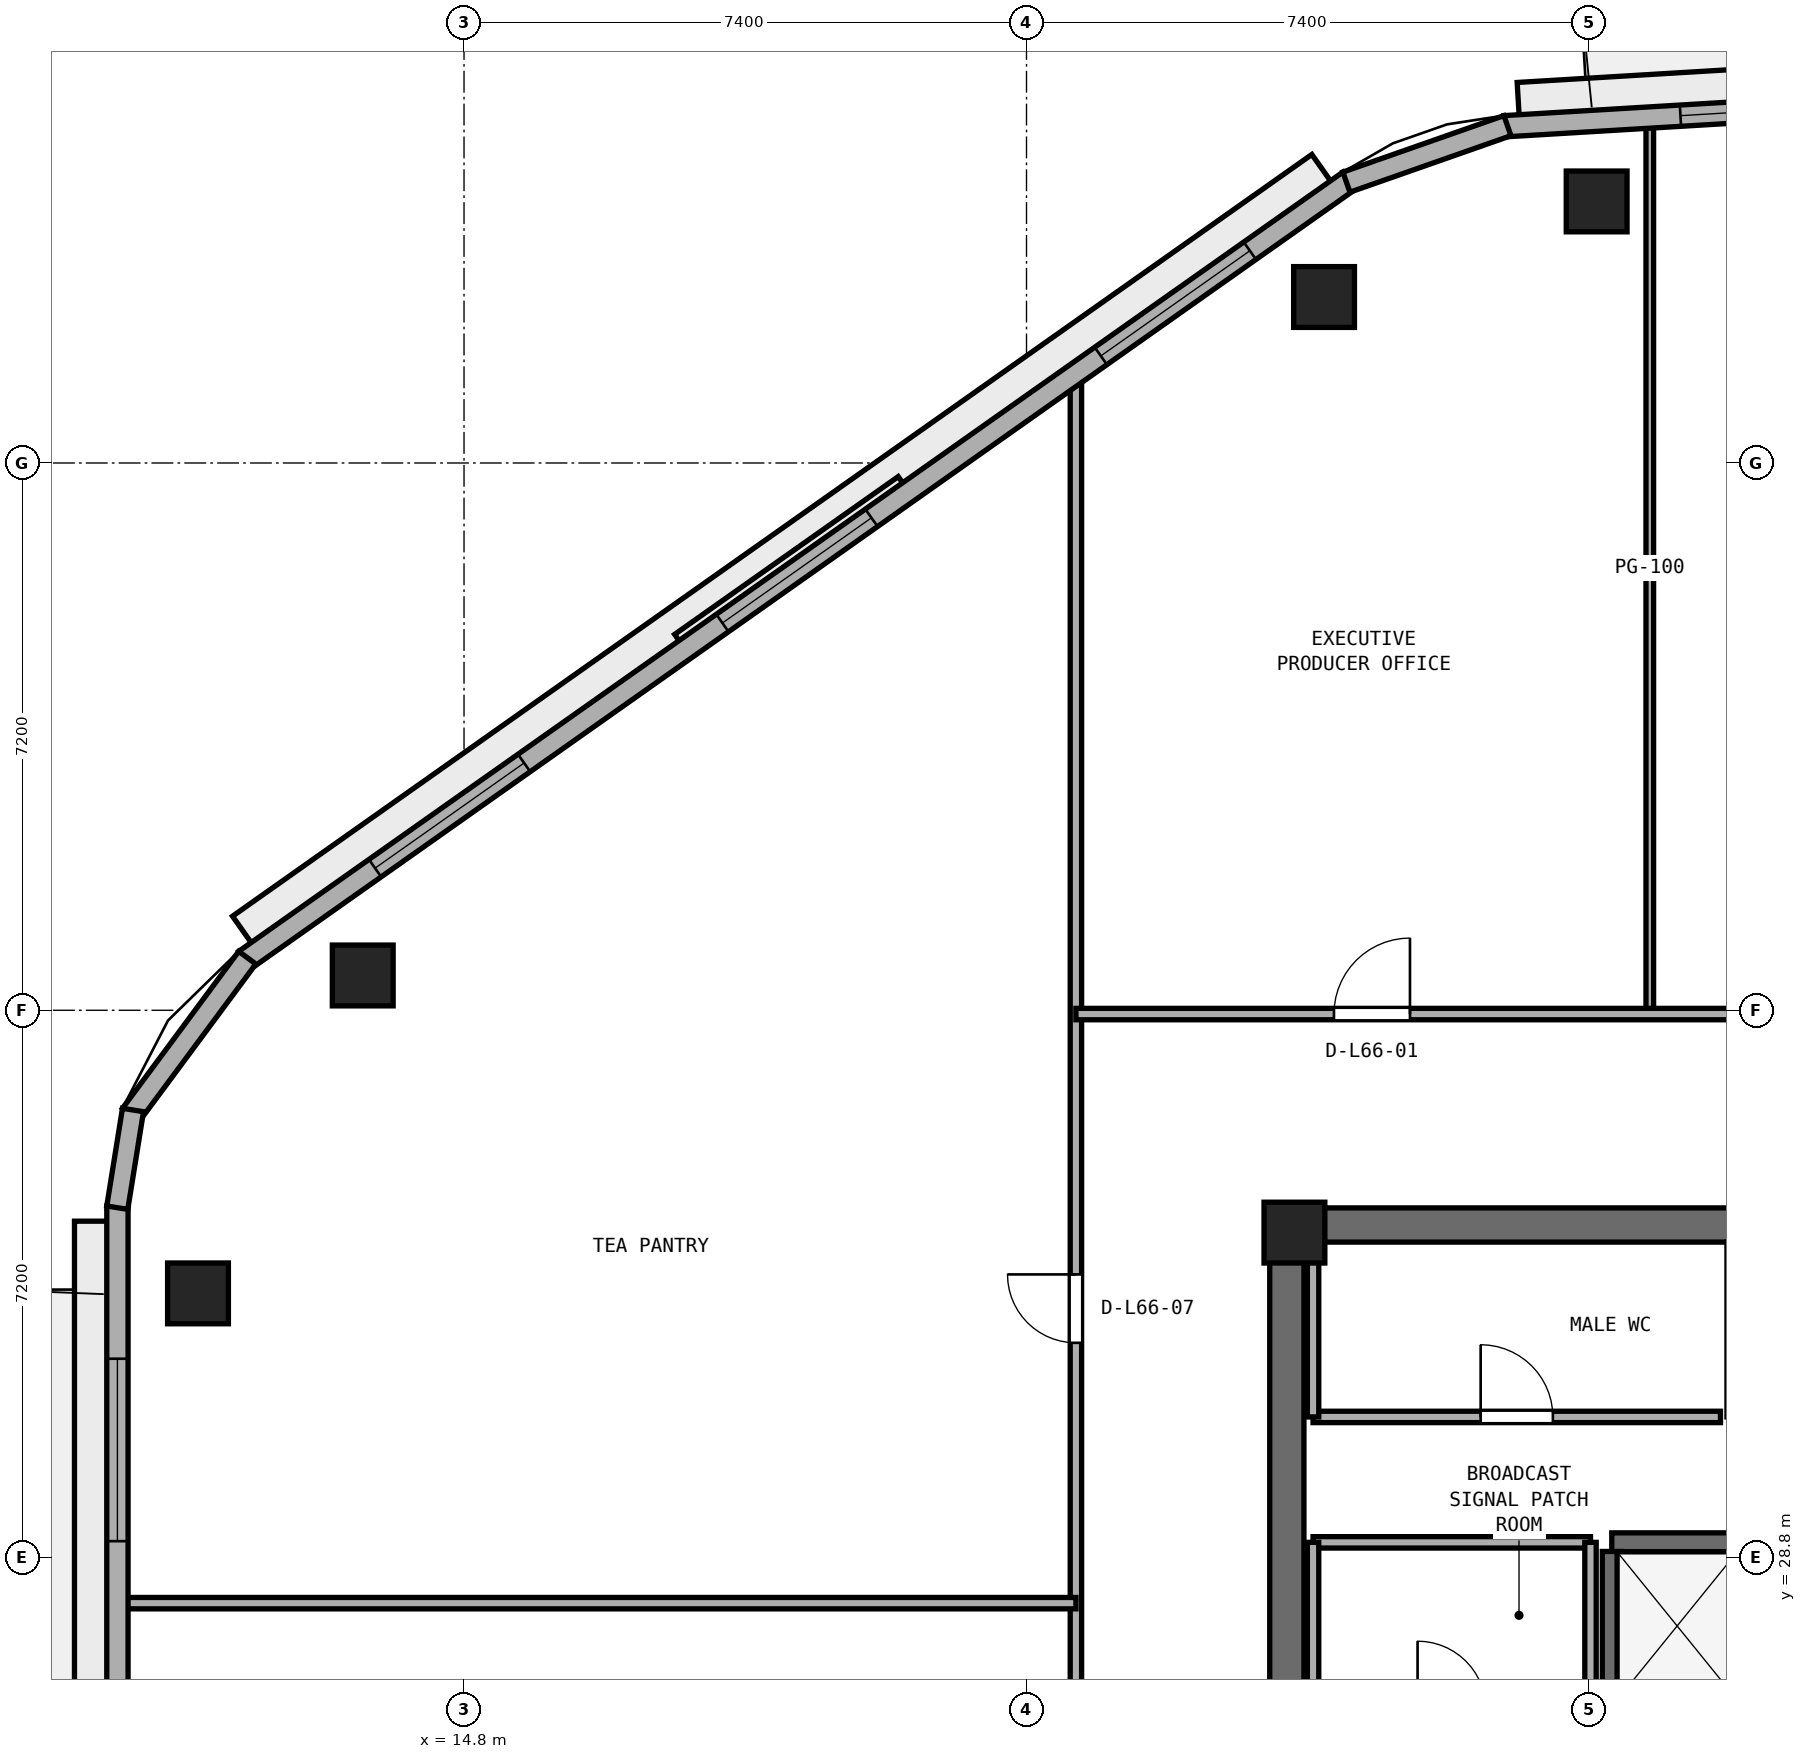
"""IFC4 building model, lengths in metres.
Left out: names, types, materials, properties, quantities, classifications, styles, units other than length and angle.
Written with IfcOpenShell. Run it as: python <this file> out.ifc"""

import sys

from ifc_helpers import new_model, si_unit, direction, frame, frame_2d, origin, origin_2d, place, context, subcontext, project, spatial, rectangle, extrude, element, fill, save


model = new_model("IFC4")
c1 = context("Model", 3, precision=1e-05, world=origin(), true_north=direction((0.0, 1.0)))
c2 = subcontext(c1, "Body", "Model", "MODEL_VIEW")
j1 = project(units=[si_unit("LENGTHUNIT", "METRE"), si_unit("PLANEANGLEUNIT", "RADIAN")], contexts=[c1])
p1 = place(None, origin())
s1 = spatial("IfcSite", under=j1, at=p1, CompositionType="ELEMENT")
p2 = place(p1, origin())
s2 = spatial("IfcBuilding", under=s1, at=p2, CompositionType="ELEMENT")
p3 = place(p2, frame((0.0, 0.0, 259.2)))
s3 = spatial("IfcBuildingStorey", under=s2, at=p3, CompositionType="ELEMENT", Elevation=259.2)
p4 = place(p3, frame((25.4, 33.175, 0.0), z_axis=(0.0, 0.0, 1.0), x_axis=(1.0, 0.0, 0.0)))
e1 = element("IfcWall", 1, at=p4, inside=s3, PredefinedType="SHEAR", context=c2, shape_type="SweptSolid", body=[
    extrude(rectangle(XDim=23.2, YDim=0.45, at=frame_2d((11.6, 0.0))), origin(), (0.0, 0.0, 1.0), 3.51),
])
p5 = place(p3, frame((25.625, 17.45, 0.0), z_axis=(0.0, 0.0, 1.0), x_axis=(0.0, 1.0, 0.0)))
e2 = element("IfcWall", 2, at=p5, inside=s3, PredefinedType="SHEAR", context=c2, shape_type="SweptSolid", body=[
    extrude(rectangle(XDim=15.5, YDim=0.45, at=frame_2d((7.75, 0.0))), origin(), (0.0, 0.0, 1.0), 3.51),
])
p6 = place(p5, frame((7.0, 0.0, 0.0)))
e3 = element("IfcOpeningElement", 3, at=p6, cuts=e2, PredefinedType="OPENING", context=c2, shape_type="SweptSolid", body=[
    extrude(rectangle(XDim=1.5, YDim=2.15, at=frame_2d((0.75, 1.075))), frame((0.0, 0.235, 0.0), z_axis=(0.0, -1.0, 0.0), x_axis=(1.0, 0.0, 0.0)), (0.0, 0.0, 1.0), 0.47),
])
p7 = place(p3, frame((25.725, 33.075, 0.0), z_axis=(0.0, 0.0, 1.0), x_axis=(1.0, 0.0, 0.0)))
e4 = element("IfcColumn", 4, at=p7, inside=s3, PredefinedType="PILASTER", context=c2, shape_type="SweptSolid", body=[
    extrude(rectangle(XDim=0.8, YDim=0.8, at=origin_2d()), origin(), (0.0, 0.0, 1.0), 3.8),
])
for number, where, z_axis, x_axis in (
    (5, (29.701, 46.641, 0.0), (0.0, 0.0, 1.0), (1.0, 0.0, 0.0)),
    (6, (26.115, 45.384, 0.0), (0.0, 0.0, 1.0), (1.0, 0.0, 0.0)),
    (7, (13.467, 36.458, 0.0), (0.0, 0.0, 1.0), (1.0, 0.0, 0.0)),
    (8, (11.3, 32.275, 0.0), (0.0, 0.0, 1.0), (1.0, 0.0, 0.0)),
):
    element("IfcColumn", number, at=place(p3, frame(where, z_axis=z_axis, x_axis=x_axis)), inside=s3, PredefinedType="COLUMN", context=c2, shape_type="SweptSolid", body=[
        extrude(rectangle(XDim=0.8, YDim=0.8, at=origin_2d()), origin(), (0.0, 0.0, 1.0), 3.8),
    ])
p8 = place(p3, frame((29.9, 29.0, 0.0), z_axis=(0.0, 0.0, 1.0), x_axis=(1.0, 0.0, 0.0)))
e9 = element("IfcWall", 9, at=p8, inside=s3, PredefinedType="SHEAR", context=c2, shape_type="SweptSolid", body=[
    extrude(rectangle(XDim=1.72, YDim=0.25, at=frame_2d((0.86, 0.0))), origin(), (0.0, 0.0, 1.0), 3.51),
])
p9 = place(p3, frame((29.9, 26.92, 0.0), z_axis=(0.0, 0.0, 1.0), x_axis=(0.0, 1.0, 0.0)))
e10 = element("IfcWall", 10, at=p9, inside=s3, PredefinedType="SHEAR", context=c2, shape_type="SweptSolid", body=[
    extrude(rectangle(XDim=1.96, YDim=0.25, at=frame_2d((0.98, 0.0))), origin(), (0.0, 0.0, 1.0), 3.51),
])
p10 = place(p3, frame((25.97, 30.65, 0.0), z_axis=(0.0, 0.0, 1.0), x_axis=(1.0, 0.0, 0.0)))
e11 = element("IfcWall", 11, at=p10, inside=s3, PredefinedType="PARTITIONING", context=c2, shape_type="SweptSolid", body=[
    extrude(rectangle(XDim=5.36, YDim=0.15, at=frame_2d((2.68, 0.0))), origin(), (0.0, 0.0, 1.0), 3.51),
])
p11 = place(p10, frame((2.205, 0.0, 0.0)))
e12 = element("IfcOpeningElement", 12, at=p11, cuts=e11, PredefinedType="OPENING", context=c2, shape_type="SweptSolid", body=[
    extrude(rectangle(XDim=0.95, YDim=2.1, at=frame_2d((0.475, 1.05))), frame((0.0, 0.085, 0.0), z_axis=(0.0, -1.0, 0.0), x_axis=(1.0, 0.0, 0.0)), (0.0, 0.0, 1.0), 0.17),
])
p12 = place(p3, frame((25.97, 30.65, 0.0), z_axis=(0.0, 0.0, 1.0), x_axis=(0.0, 1.0, 0.0)))
e13 = element("IfcWall", 13, at=p12, inside=s3, PredefinedType="PARTITIONING", context=c2, shape_type="SweptSolid", body=[
    extrude(rectangle(XDim=2.3, YDim=0.15, at=frame_2d((1.15, 0.0))), origin(), (0.0, 0.0, 1.0), 2.61),
])
p13 = place(p3, frame((25.97, 29.0, 0.0), z_axis=(0.0, 0.0, 1.0), x_axis=(1.0, 0.0, 0.0)))
e14 = element("IfcWall", 14, at=p13, inside=s3, PredefinedType="PARTITIONING", context=c2, shape_type="SweptSolid", body=[
    extrude(rectangle(XDim=3.65, YDim=0.15, at=frame_2d((1.825, 0.0))), origin(), (0.0, 0.0, 1.0), 3.51),
])
p14 = place(p3, frame((25.97, 26.8, 0.0), z_axis=(0.0, 0.0, 1.0), x_axis=(0.0, 1.0, 0.0)))
e15 = element("IfcWall", 15, at=p14, inside=s3, PredefinedType="PARTITIONING", context=c2, shape_type="SweptSolid", body=[
    extrude(rectangle(XDim=2.2, YDim=0.15, at=frame_2d((1.1, 0.0))), origin(), (0.0, 0.0, 1.0), 2.61),
])
p15 = place(p3, frame((29.62, 26.8, 0.0), z_axis=(0.0, 0.0, 1.0), x_axis=(0.0, 1.0, 0.0)))
e16 = element("IfcWall", 16, at=p15, inside=s3, PredefinedType="PARTITIONING", context=c2, shape_type="SweptSolid", body=[
    extrude(rectangle(XDim=2.2, YDim=0.15, at=frame_2d((1.1, 0.0))), origin(), (0.0, 0.0, 1.0), 3.51),
])
p16 = place(p3, frame((30.4, 35.95, 0.0), z_axis=(0.0, 0.0, 1.0), x_axis=(0.0, 1.0, 0.0)))
e17 = element("IfcWall", 17, at=p16, inside=s3, PredefinedType="PARTITIONING", context=c2, shape_type="SweptSolid", body=[
    extrude(rectangle(XDim=11.73, YDim=0.1, at=frame_2d((5.865, 0.0))), origin(), (0.0, 0.0, 1.0), 3.51),
])
p17 = place(p3, frame((22.85, 5.758, 0.0), z_axis=(0.0, 0.0, 1.0), x_axis=(0.0, 1.0, 0.0)))
e18 = element("IfcWall", 18, at=p17, inside=s3, PredefinedType="PARTITIONING", context=c2, shape_type="SweptSolid", body=[
    extrude(rectangle(XDim=38.65, YDim=0.15, at=frame_2d((19.325, 0.0))), origin(), (0.0, 0.0, 1.0), 3.51),
])
p18 = place(p17, frame((11.367, 0.0, 0.0)))
e19 = element("IfcOpeningElement", 19, at=p18, cuts=e18, PredefinedType="OPENING", context=c2, shape_type="SweptSolid", body=[
    extrude(rectangle(XDim=0.9, YDim=2.1, at=frame_2d((0.45, 1.05))), frame((0.0, 0.085, 0.0), z_axis=(0.0, -1.0, 0.0), x_axis=(1.0, 0.0, 0.0)), (0.0, 0.0, 1.0), 0.17),
])
p19 = place(p17, frame((18.242, 0.0, 0.0)))
e20 = element("IfcOpeningElement", 20, at=p19, cuts=e18, PredefinedType="OPENING", context=c2, shape_type="SweptSolid", body=[
    extrude(rectangle(XDim=0.9, YDim=2.1, at=frame_2d((0.45, 1.05))), frame((0.0, 0.085, 0.0), z_axis=(0.0, -1.0, 0.0), x_axis=(1.0, 0.0, 0.0)), (0.0, 0.0, 1.0), 0.17),
])
p20 = place(p17, frame((25.867, 0.0, 0.0)))
e21 = element("IfcOpeningElement", 21, at=p20, cuts=e18, PredefinedType="OPENING", context=c2, shape_type="SweptSolid", body=[
    extrude(rectangle(XDim=0.9, YDim=2.1, at=frame_2d((0.45, 1.05))), frame((0.0, 0.085, 0.0), z_axis=(0.0, -1.0, 0.0), x_axis=(1.0, 0.0, 0.0)), (0.0, 0.0, 1.0), 0.17),
])
p21 = place(p3, frame((10.305, 28.2, 0.0), z_axis=(0.0, 0.0, 1.0), x_axis=(1.0, 0.0, 0.0)))
e22 = element("IfcWall", 22, at=p21, inside=s3, PredefinedType="PARTITIONING", context=c2, shape_type="SweptSolid", body=[
    extrude(rectangle(XDim=12.545, YDim=0.15, at=frame_2d((6.272, 0.0))), origin(), (0.0, 0.0, 1.0), 3.51),
])
p22 = place(p3, frame((22.85, 35.95, 0.0), z_axis=(0.0, 0.0, 1.0), x_axis=(1.0, 0.0, 0.0)))
e23 = element("IfcWall", 23, at=p22, inside=s3, PredefinedType="PARTITIONING", context=c2, shape_type="SweptSolid", body=[
    extrude(rectangle(XDim=25.75, YDim=0.15, at=frame_2d((12.875, 0.0))), origin(), (0.0, 0.0, 1.0), 3.51),
])
p23 = place(p22, frame((3.395, 0.0, 0.0)))
e24 = element("IfcOpeningElement", 24, at=p23, cuts=e23, PredefinedType="OPENING", context=c2, shape_type="SweptSolid", body=[
    extrude(rectangle(XDim=1.0, YDim=2.12, at=frame_2d((0.5, 1.06))), frame((0.0, 0.085, 0.0), z_axis=(0.0, -1.0, 0.0), x_axis=(1.0, 0.0, 0.0)), (0.0, 0.0, 1.0), 0.17),
])
p24 = place(p22, frame((16.03, 0.0, 0.0)))
e25 = element("IfcOpeningElement", 25, at=p24, cuts=e23, PredefinedType="OPENING", context=c2, shape_type="SweptSolid", body=[
    extrude(rectangle(XDim=1.0, YDim=2.12, at=frame_2d((0.5, 1.06))), frame((0.0, 0.085, 0.0), z_axis=(0.0, -1.0, 0.0), x_axis=(1.0, 0.0, 0.0)), (0.0, 0.0, 1.0), 0.17),
])
p25 = place(p3, frame((47.566, 48.775, 0.0), z_axis=(0.0, 0.0, 1.0), x_axis=(-0.998202767485, -0.059926913695, 0.0)))
e26 = element("IfcWall", 26, at=p25, inside=s3, PredefinedType="STANDARD", context=c2, shape_type="SweptSolid", body=[
    extrude(rectangle(XDim=19.111, YDim=0.28, at=frame_2d((9.556, 0.0))), origin(), (0.0, 0.0, 1.0), 3.51),
])
p26 = place(p25, frame((9.005, 0.0, 0.0)))
e27 = element("IfcOpeningElement", 27, at=p26, cuts=e26, PredefinedType="OPENING", context=c2, shape_type="SweptSolid", body=[
    extrude(rectangle(XDim=1.1, YDim=2.2, at=frame_2d((0.55, 1.1))), frame((0.0, 0.15, 0.0), z_axis=(0.0, -1.0, 0.0), x_axis=(1.0, 0.0, 0.0)), (0.0, 0.0, 1.0), 0.3),
])
p27 = place(p25, frame((2.319, 0.0, 0.9)))
e28 = element("IfcOpeningElement", 28, at=p27, cuts=e26, PredefinedType="OPENING", context=c2, shape_type="SweptSolid", body=[
    extrude(rectangle(XDim=2.4, YDim=1.75, at=frame_2d((1.2, 0.875))), frame((0.0, 0.15, 0.0), z_axis=(0.0, -1.0, 0.0), x_axis=(1.0, 0.0, 0.0)), (0.0, 0.0, 1.0), 0.3),
])
p28 = place(p25, frame((14.392, 0.0, 0.9)))
e29 = element("IfcOpeningElement", 29, at=p28, cuts=e26, PredefinedType="OPENING", context=c2, shape_type="SweptSolid", body=[
    extrude(rectangle(XDim=2.4, YDim=1.75, at=frame_2d((1.2, 0.875))), frame((0.0, 0.15, 0.0), z_axis=(0.0, -1.0, 0.0), x_axis=(1.0, 0.0, 0.0)), (0.0, 0.0, 1.0), 0.3),
])
p29 = place(p3, frame((26.443, 46.913, 0.0), z_axis=(0.0, 0.0, 1.0), x_axis=(-0.817024179766, -0.576603407619, 0.0)))
e30 = element("IfcWall", 30, at=p29, inside=s3, PredefinedType="STANDARD", context=c2, shape_type="SweptSolid", body=[
    extrude(rectangle(XDim=17.78, YDim=0.28, at=frame_2d((8.89, 0.0))), origin(), (0.0, 0.0, 1.0), 3.51),
])
p30 = place(p29, frame((1.597, 0.0, 0.9)))
e31 = element("IfcOpeningElement", 31, at=p30, cuts=e30, PredefinedType="OPENING", context=c2, shape_type="SweptSolid", body=[
    extrude(rectangle(XDim=2.4, YDim=1.75, at=frame_2d((1.2, 0.875))), frame((0.0, 0.15, 0.0), z_axis=(0.0, -1.0, 0.0), x_axis=(1.0, 0.0, 0.0)), (0.0, 0.0, 1.0), 0.3),
])
p31 = place(p29, frame((7.69, 0.0, 0.9)))
e32 = element("IfcOpeningElement", 32, at=p31, cuts=e30, PredefinedType="OPENING", context=c2, shape_type="SweptSolid", body=[
    extrude(rectangle(XDim=2.4, YDim=1.75, at=frame_2d((1.2, 0.875))), frame((0.0, 0.15, 0.0), z_axis=(0.0, -1.0, 0.0), x_axis=(1.0, 0.0, 0.0)), (0.0, 0.0, 1.0), 0.3),
])
p32 = place(p29, frame((13.283, 0.0, 0.9)))
e33 = element("IfcOpeningElement", 33, at=p32, cuts=e30, PredefinedType="OPENING", context=c2, shape_type="SweptSolid", body=[
    extrude(rectangle(XDim=2.4, YDim=1.75, at=frame_2d((1.2, 0.875))), frame((0.0, 0.15, 0.0), z_axis=(0.0, -1.0, 0.0), x_axis=(1.0, 0.0, 0.0)), (0.0, 0.0, 1.0), 0.3),
])
p33 = place(p3, frame((10.24, 33.425, 0.0), z_axis=(0.0, 0.0, 1.0), x_axis=(0.0, -1.0, 0.0)))
e34 = element("IfcWall", 34, at=p33, inside=s3, PredefinedType="STANDARD", context=c2, shape_type="SweptSolid", body=[
    extrude(rectangle(XDim=17.257, YDim=0.28, at=frame_2d((8.628, 0.0))), origin(), (0.0, 0.0, 1.0), 3.51),
])
p34 = place(p33, frame((8.078, 0.0, 0.0)))
e35 = element("IfcOpeningElement", 35, at=p34, cuts=e34, PredefinedType="OPENING", context=c2, shape_type="SweptSolid", body=[
    extrude(rectangle(XDim=1.1, YDim=2.2, at=frame_2d((0.55, 1.1))), frame((0.0, 0.15, 0.0), z_axis=(0.0, -1.0, 0.0), x_axis=(1.0, 0.0, 0.0)), (0.0, 0.0, 1.0), 0.3),
])
p35 = place(p33, frame((2.01, 0.0, 0.9)))
e36 = element("IfcOpeningElement", 36, at=p35, cuts=e34, PredefinedType="OPENING", context=c2, shape_type="SweptSolid", body=[
    extrude(rectangle(XDim=2.4, YDim=1.75, at=frame_2d((1.2, 0.875))), frame((0.0, 0.15, 0.0), z_axis=(0.0, -1.0, 0.0), x_axis=(1.0, 0.0, 0.0)), (0.0, 0.0, 1.0), 0.3),
])
p36 = place(p33, frame((13.097, 0.0, 0.9)))
e37 = element("IfcOpeningElement", 37, at=p36, cuts=e34, PredefinedType="OPENING", context=c2, shape_type="SweptSolid", body=[
    extrude(rectangle(XDim=2.4, YDim=1.75, at=frame_2d((1.2, 0.875))), frame((0.0, 0.15, 0.0), z_axis=(0.0, -1.0, 0.0), x_axis=(1.0, 0.0, 0.0)), (0.0, 0.0, 1.0), 0.3),
])
p37 = place(p3, frame((28.527, 47.638, 0.0), z_axis=(0.0, 0.0, 1.0), x_axis=(-0.943686979207, -0.330839667022, 0.0)))
e38 = element("IfcWall", 38, at=p37, inside=s3, PredefinedType="STANDARD", context=c2, shape_type="SweptSolid", body=[
    extrude(rectangle(XDim=2.245, YDim=0.28, at=frame_2d((1.123, 0.0))), origin(), (0.0, 0.0, 1.0), 3.51),
])
p38 = place(p3, frame((11.948, 36.692, 0.0), z_axis=(0.0, 0.0, 1.0), x_axis=(-0.595170751493, -0.803599263668, 0.0)))
e39 = element("IfcWall", 39, at=p38, inside=s3, PredefinedType="STANDARD", context=c2, shape_type="SweptSolid", body=[
    extrude(rectangle(XDim=2.57, YDim=0.28, at=frame_2d((1.285, 0.0))), origin(), (0.0, 0.0, 1.0), 3.51),
])
p39 = place(p3, frame((10.445, 34.688, 0.0), z_axis=(0.0, 0.0, 1.0), x_axis=(-0.158524605336, -0.987355027081, 0.0)))
e40 = element("IfcWall", 40, at=p39, inside=s3, PredefinedType="STANDARD", context=c2, shape_type="SweptSolid", body=[
    extrude(rectangle(XDim=1.301, YDim=0.28, at=frame_2d((0.651, 0.0))), origin(), (0.0, 0.0, 1.0), 3.51),
])
p40 = place(p11, origin())
e41 = element("IfcDoor", 41, at=p40, inside=s3, OperationType="SINGLE_SWING_LEFT", PredefinedType="DOOR", context=c2, shape_type="SweptSolid", body=[
    extrude(rectangle(XDim=0.95, YDim=2.1, at=frame_2d((0.475, 1.05))), frame((0.0, 0.025, 0.0), z_axis=(0.0, -1.0, 0.0), x_axis=(1.0, 0.0, 0.0)), (0.0, 0.0, 1.0), 0.05),
])
fill(e12, e41)
p41 = place(p23, origin())
e42 = element("IfcDoor", 42, at=p41, inside=s3, OperationType="SINGLE_SWING_RIGHT", PredefinedType="DOOR", context=c2, shape_type="SweptSolid", body=[
    extrude(rectangle(XDim=1.0, YDim=2.12, at=frame_2d((0.5, 1.06))), frame((0.0, 0.025, 0.0), z_axis=(0.0, -1.0, 0.0), x_axis=(1.0, 0.0, 0.0)), (0.0, 0.0, 1.0), 0.05),
])
fill(e24, e42)
p42 = place(p20, origin())
e43 = element("IfcDoor", 43, at=p42, inside=s3, OperationType="SINGLE_SWING_RIGHT", PredefinedType="DOOR", context=c2, shape_type="SweptSolid", body=[
    extrude(rectangle(XDim=0.9, YDim=2.1, at=frame_2d((0.45, 1.05))), frame((0.0, 0.025, 0.0), z_axis=(0.0, -1.0, 0.0), x_axis=(1.0, 0.0, 0.0)), (0.0, 0.0, 1.0), 0.05),
])
fill(e21, e43)
p43 = place(p28, origin())
e44 = element("IfcWindow", 44, at=p43, inside=s3, PartitioningType="SINGLE_PANEL", PredefinedType="WINDOW", context=c2, shape_type="SweptSolid", body=[
    extrude(rectangle(XDim=2.4, YDim=1.75, at=frame_2d((1.2, 0.875))), frame((0.0, 0.03, 0.0), z_axis=(0.0, -1.0, 0.0), x_axis=(1.0, 0.0, 0.0)), (0.0, 0.0, 1.0), 0.06),
])
fill(e29, e44)
p44 = place(p30, origin())
e45 = element("IfcWindow", 45, at=p44, inside=s3, PartitioningType="SINGLE_PANEL", PredefinedType="WINDOW", context=c2, shape_type="SweptSolid", body=[
    extrude(rectangle(XDim=2.4, YDim=1.75, at=frame_2d((1.2, 0.875))), frame((0.0, 0.03, 0.0), z_axis=(0.0, -1.0, 0.0), x_axis=(1.0, 0.0, 0.0)), (0.0, 0.0, 1.0), 0.06),
])
fill(e31, e45)
p45 = place(p31, origin())
e46 = element("IfcWindow", 46, at=p45, inside=s3, PartitioningType="SINGLE_PANEL", PredefinedType="WINDOW", context=c2, shape_type="SweptSolid", body=[
    extrude(rectangle(XDim=2.4, YDim=1.75, at=frame_2d((1.2, 0.875))), frame((0.0, 0.03, 0.0), z_axis=(0.0, -1.0, 0.0), x_axis=(1.0, 0.0, 0.0)), (0.0, 0.0, 1.0), 0.06),
])
fill(e32, e46)
p46 = place(p32, origin())
e47 = element("IfcWindow", 47, at=p46, inside=s3, PartitioningType="SINGLE_PANEL", PredefinedType="WINDOW", context=c2, shape_type="SweptSolid", body=[
    extrude(rectangle(XDim=2.4, YDim=1.75, at=frame_2d((1.2, 0.875))), frame((0.0, 0.03, 0.0), z_axis=(0.0, -1.0, 0.0), x_axis=(1.0, 0.0, 0.0)), (0.0, 0.0, 1.0), 0.06),
])
fill(e33, e47)
p47 = place(p35, origin())
e48 = element("IfcWindow", 48, at=p47, inside=s3, PartitioningType="SINGLE_PANEL", PredefinedType="WINDOW", context=c2, shape_type="SweptSolid", body=[
    extrude(rectangle(XDim=2.4, YDim=1.75, at=frame_2d((1.2, 0.875))), frame((0.0, 0.03, 0.0), z_axis=(0.0, -1.0, 0.0), x_axis=(1.0, 0.0, 0.0)), (0.0, 0.0, 1.0), 0.06),
])
fill(e36, e48)
save(model, sys.argv[1])
